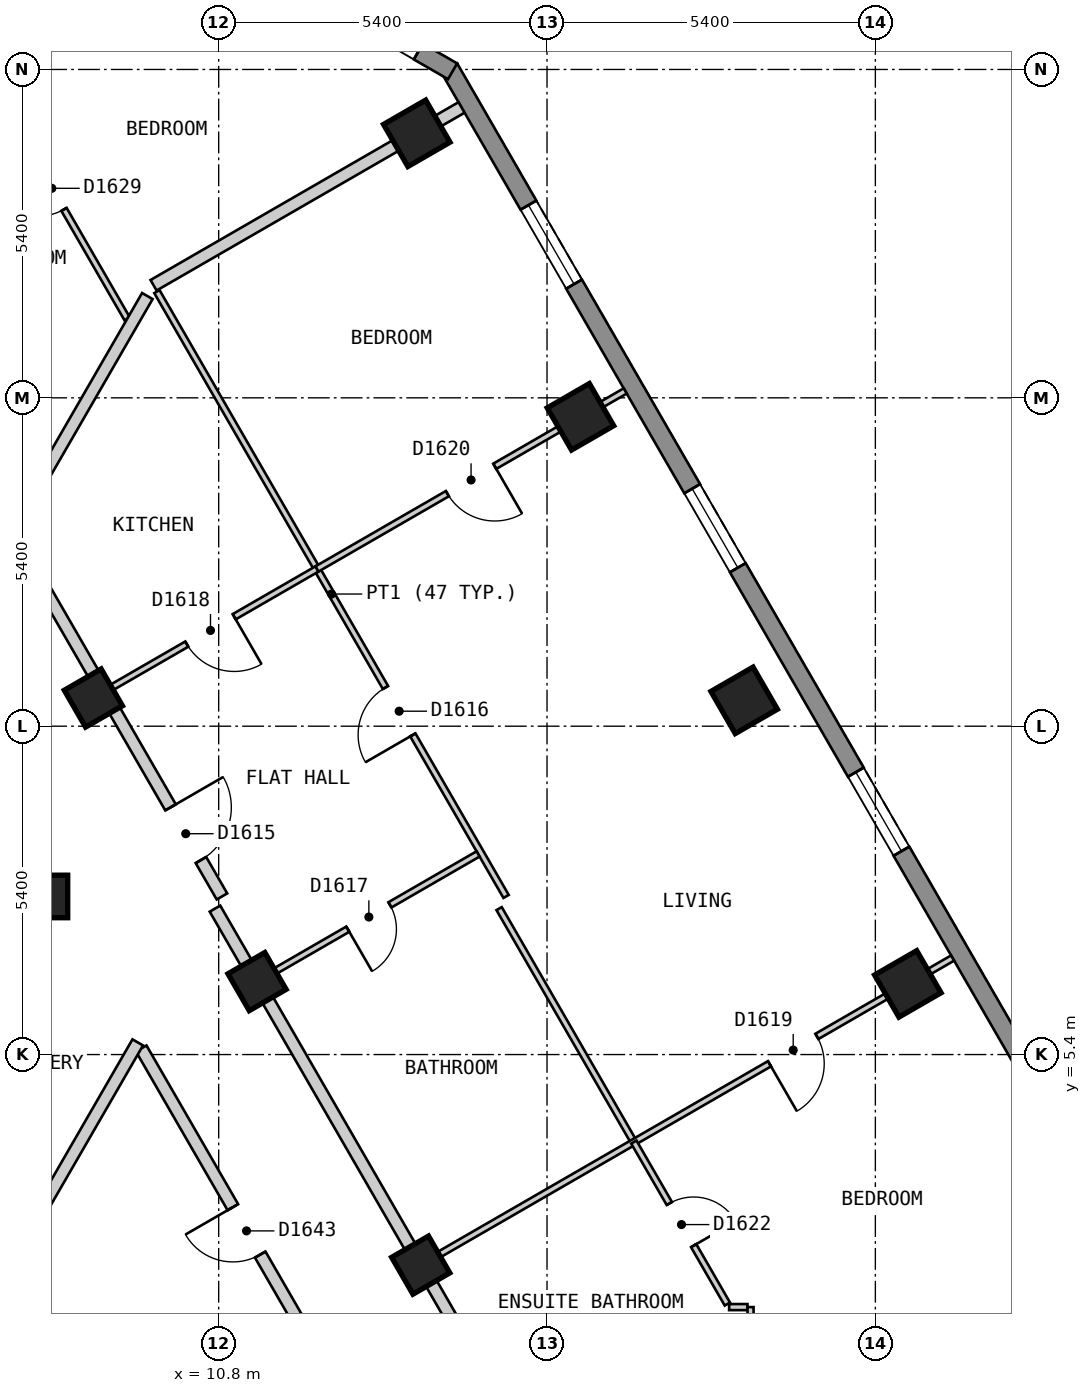
"""IFC4 building model, lengths in metres.
Left out: names, types, materials, properties, quantities, classifications, styles, units other than length and angle.
Written with IfcOpenShell. Run it as: python <this file> out.ifc"""

import sys

from ifc_helpers import new_model, si_unit, direction, frame, frame_2d, origin, origin_2d, place, context, subcontext, project, spatial, polyline, rectangle, outline, extrude, element, fill, save


model = new_model("IFC4")
c1 = context("Model", 3, precision=1e-05, world=origin(), true_north=direction((0.0, 1.0)))
c2 = subcontext(c1, "Body", "Model", "MODEL_VIEW")
j1 = project(units=[si_unit("LENGTHUNIT", "METRE"), si_unit("PLANEANGLEUNIT", "RADIAN")], contexts=[c1])
p1 = place(None, origin())
s1 = spatial("IfcSite", under=j1, at=p1, CompositionType="ELEMENT")
p2 = place(p1, origin())
s2 = spatial("IfcBuilding", under=s1, at=p2, CompositionType="ELEMENT")
p3 = place(p2, frame((0.0, 0.0, 169.2)))
s3 = spatial("IfcBuildingStorey", under=s2, at=p3, CompositionType="ELEMENT", Elevation=169.2)
for number, where, z_axis, x_axis in (
    (1, (22.134, 6.562, 0.0), (0.0, 0.0, 1.0), (-0.5, 0.866, 0.0)),
    (2, (19.442, 11.225, 0.0), (0.0, 0.0, 1.0), (-0.5, 0.866, 0.0)),
    (3, (16.75, 15.888, 0.0), (0.0, 0.0, 1.0), (-0.5, 0.866, 0.0)),
    (4, (14.058, 20.55, 0.0), (0.0, 0.0, 1.0), (-0.5, 0.866, 0.0)),
):
    element("IfcColumn", number, at=place(p3, frame(where, z_axis=z_axis, x_axis=x_axis)), inside=s3, PredefinedType="COLUMN", context=c2, shape_type="SweptSolid", body=[
        extrude(rectangle(XDim=0.8, YDim=0.8, at=origin_2d()), origin(), (0.0, 0.0, 1.0), 3.0),
    ])
for number, where, z_axis, x_axis in (
    (5, (14.123, 1.937, 0.0), (0.0, 0.0, 1.0), (-0.5, 0.866, 0.0)),
    (6, (11.431, 6.6, 0.0), (0.0, 0.0, 1.0), (-0.5, 0.866, 0.0)),
    (7, (7.967, 8.0, 0.0), (0.0, 0.0, 1.0), (1.0, 0.0, 0.0)),
    (8, (8.739, 11.263, 0.0), (0.0, 0.0, 1.0), (-0.5, 0.866, 0.0)),
):
    element("IfcColumn", number, at=place(p3, frame(where, z_axis=z_axis, x_axis=x_axis)), inside=s3, PredefinedType="COLUMN", context=c2, shape_type="SweptSolid", body=[
        extrude(rectangle(XDim=0.7, YDim=0.7, at=origin_2d()), origin(), (0.0, 0.0, 1.0), 3.0),
    ])
p4 = place(p3, frame((26.024, 1.825, 0.0), z_axis=(0.0, 0.0, 1.0), x_axis=(-0.500010537973, 0.866019319597, 0.0)))
e9 = element("IfcWall", 9, at=p4, inside=s3, PredefinedType="SOLIDWALL", context=c2, shape_type="SweptSolid", body=[
    extrude(outline(polyline([(0.0, -0.15), (22.863, -0.15), (22.783, 0.15), (0.08, 0.15), (0.0, -0.15)])), origin(), (0.0, 0.0, 1.0), 2.7),
])
p5 = place(p4, frame((2.606, 0.0, 0.15)))
e10 = element("IfcOpeningElement", 10, at=p5, cuts=e9, PredefinedType="OPENING", context=c2, shape_type="SweptSolid", body=[
    extrude(rectangle(XDim=1.5, YDim=2.1, at=frame_2d((0.75, 1.05))), frame((0.0, 0.16, 0.0), z_axis=(0.0, -1.0, 0.0), x_axis=(1.0, 0.0, 0.0)), (0.0, 0.0, 1.0), 0.32),
])
p6 = place(p4, frame((7.99, 0.0, 0.15)))
e11 = element("IfcOpeningElement", 11, at=p6, cuts=e9, PredefinedType="OPENING", context=c2, shape_type="SweptSolid", body=[
    extrude(rectangle(XDim=1.5, YDim=2.1, at=frame_2d((0.75, 1.05))), frame((0.0, 0.16, 0.0), z_axis=(0.0, -1.0, 0.0), x_axis=(1.0, 0.0, 0.0)), (0.0, 0.0, 1.0), 0.32),
])
p7 = place(p4, frame((13.373, 0.0, 0.15)))
e12 = element("IfcOpeningElement", 12, at=p7, cuts=e9, PredefinedType="OPENING", context=c2, shape_type="SweptSolid", body=[
    extrude(rectangle(XDim=1.5, YDim=2.1, at=frame_2d((0.75, 1.05))), frame((0.0, 0.16, 0.0), z_axis=(0.0, -1.0, 0.0), x_axis=(1.0, 0.0, 0.0)), (0.0, 0.0, 1.0), 0.32),
])
p8 = place(p4, frame((18.758, 0.0, 0.15)))
e13 = element("IfcOpeningElement", 13, at=p8, cuts=e9, PredefinedType="OPENING", context=c2, shape_type="SweptSolid", body=[
    extrude(rectangle(XDim=1.5, YDim=2.1, at=frame_2d((0.75, 1.05))), frame((0.0, 0.16, 0.0), z_axis=(0.0, -1.0, 0.0), x_axis=(1.0, 0.0, 0.0)), (0.0, 0.0, 1.0), 0.32),
])
p9 = place(p3, frame((14.647, 21.57, 0.0), z_axis=(0.0, 0.0, 1.0), x_axis=(-0.866022959057, 0.500004234368, 0.0)))
e14 = element("IfcWall", 14, at=p9, inside=s3, PredefinedType="SOLIDWALL", context=c2, shape_type="SweptSolid", body=[
    extrude(outline(polyline([(0.0, -0.15), (5.0, -0.15), (4.92, 0.15), (0.08, 0.15), (0.0, -0.15)])), origin(), (0.0, 0.0, 1.0), 2.7),
])
p10 = place(p9, frame((0.65, 0.0, 0.15)))
e15 = element("IfcOpeningElement", 15, at=p10, cuts=e14, PredefinedType="OPENING", context=c2, shape_type="SweptSolid", body=[
    extrude(rectangle(XDim=1.2, YDim=2.1, at=frame_2d((0.6, 1.05))), frame((0.0, 0.16, 0.0), z_axis=(0.0, -1.0, 0.0), x_axis=(1.0, 0.0, 0.0)), (0.0, 0.0, 1.0), 0.32),
])
p11 = place(p3, frame((9.526, 5.5, 0.0), z_axis=(0.0, 0.0, 1.0), x_axis=(0.500062092869, -0.865989551482, 0.0)))
e16 = element("IfcWall", 16, at=p11, inside=s3, PredefinedType="PARTITIONING", context=c2, shape_type="SweptSolid", body=[
    extrude(rectangle(XDim=6.927, YDim=0.2, at=frame_2d((3.464, 0.0))), origin(), (0.0, 0.0, 1.0), 2.7),
])
p12 = place(p11, frame((3.014, 0.0, 0.0)))
e17 = element("IfcOpeningElement", 17, at=p12, cuts=e16, PredefinedType="OPENING", context=c2, shape_type="SweptSolid", body=[
    extrude(rectangle(XDim=0.9, YDim=2.1, at=frame_2d((0.45, 1.05))), frame((0.0, 0.11, 0.0), z_axis=(0.0, -1.0, 0.0), x_axis=(1.0, 0.0, 0.0)), (0.0, 0.0, 1.0), 0.22),
])
p13 = place(p3, frame((10.739, 7.8, 0.0), z_axis=(0.0, 0.0, 1.0), x_axis=(0.499964311759, -0.86604600742, 0.0)))
e18 = element("IfcWall", 18, at=p13, inside=s3, PredefinedType="PARTITIONING", context=c2, shape_type="SweptSolid", body=[
    extrude(rectangle(XDim=9.583, YDim=0.2, at=frame_2d((4.792, 0.0))), origin(), (0.0, 0.0, 1.0), 2.7),
])
p14 = place(p3, frame((5.485, 17.3, 0.0), z_axis=(0.0, 0.0, 1.0), x_axis=(0.499965832213, -0.866045129667, 0.0)))
e19 = element("IfcWall", 19, at=p14, inside=s3, PredefinedType="PARTITIONING", context=c2, shape_type="SweptSolid", body=[
    extrude(rectangle(XDim=10.739, YDim=0.2, at=frame_2d((5.369, 0.0))), origin(), (0.0, 0.0, 1.0), 2.7),
])
p15 = place(p14, frame((9.047, 0.0, 0.0)))
e20 = element("IfcOpeningElement", 20, at=p15, cuts=e19, PredefinedType="OPENING", context=c2, shape_type="SweptSolid", body=[
    extrude(rectangle(XDim=1.0, YDim=2.1, at=frame_2d((0.5, 1.05))), frame((0.0, 0.11, 0.0), z_axis=(0.0, -1.0, 0.0), x_axis=(1.0, 0.0, 0.0)), (0.0, 0.0, 1.0), 0.22),
])
p16 = place(p3, frame((7.028, 1.373, 0.0), z_axis=(0.0, 0.0, 1.0), x_axis=(0.500065924398, 0.86598733897, 0.0)))
e21 = element("IfcWall", 21, at=p16, inside=s3, PredefinedType="PARTITIONING", context=c2, shape_type="SweptSolid", body=[
    extrude(rectangle(XDim=4.881, YDim=0.2, at=frame_2d((2.44, 0.0))), origin(), (0.0, 0.0, 1.0), 2.7),
])
p17 = place(p3, frame((7.419, 20.749, 0.0), z_axis=(0.0, 0.0, 1.0), x_axis=(0.499917691695, -0.866072919292, 0.0)))
e22 = element("IfcWall", 22, at=p17, inside=s3, PredefinedType="PARTITIONING", context=c2, shape_type="SweptSolid", body=[
    extrude(rectangle(XDim=3.753, YDim=0.1, at=frame_2d((1.876, 0.0))), origin(), (0.0, 0.0, 1.0), 2.7),
])
p18 = place(p17, frame((0.874, 0.0, 0.0)))
e23 = element("IfcOpeningElement", 23, at=p18, cuts=e22, PredefinedType="OPENING", context=c2, shape_type="SweptSolid", body=[
    extrude(rectangle(XDim=0.8, YDim=2.1, at=frame_2d((0.4, 1.05))), frame((0.0, 0.06, 0.0), z_axis=(0.0, -1.0, 0.0), x_axis=(1.0, 0.0, 0.0)), (0.0, 0.0, 1.0), 0.12),
])
p19 = place(p3, frame((15.412, 7.8, 0.0), z_axis=(0.0, 0.0, 1.0), x_axis=(0.499882970317, -0.866092960361, 0.0)))
e24 = element("IfcWall", 24, at=p19, inside=s3, PredefinedType="PARTITIONING", context=c2, shape_type="SweptSolid", body=[
    extrude(rectangle(XDim=4.433, YDim=0.1, at=frame_2d((2.216, 0.0))), origin(), (0.0, 0.0, 1.0), 2.7),
])
p20 = place(p3, frame((9.784, 17.947, 0.0), z_axis=(0.0, 0.0, 1.0), x_axis=(0.500016228266, -0.866016034188, 0.0)))
e25 = element("IfcWall", 25, at=p20, inside=s3, PredefinedType="PARTITIONING", context=c2, shape_type="SweptSolid", body=[
    extrude(rectangle(XDim=11.486, YDim=0.1, at=frame_2d((5.743, 0.0))), origin(), (0.0, 0.0, 1.0), 2.7),
])
p21 = place(p20, frame((7.518, 0.0, 0.0)))
e26 = element("IfcOpeningElement", 26, at=p21, cuts=e25, PredefinedType="OPENING", context=c2, shape_type="SweptSolid", body=[
    extrude(rectangle(XDim=0.9, YDim=2.1, at=frame_2d((0.45, 1.05))), frame((0.0, 0.06, 0.0), z_axis=(0.0, -1.0, 0.0), x_axis=(1.0, 0.0, 0.0)), (0.0, 0.0, 1.0), 0.12),
])
p22 = place(p3, frame((19.195, 1.247, 0.0), z_axis=(0.0, 0.0, 1.0), x_axis=(1.0, 0.0, 0.0)))
e27 = element("IfcWall", 27, at=p22, inside=s3, PredefinedType="PARTITIONING", context=c2, shape_type="SweptSolid", body=[
    extrude(rectangle(XDim=0.302, YDim=0.1, at=frame_2d((0.151, 0.0))), origin(), (0.0, 0.0, 1.0), 2.7),
])
p23 = place(p3, frame((19.547, 0.638, 0.0), z_axis=(0.0, 0.0, 1.0), x_axis=(0.0, 1.0, 0.0)))
e28 = element("IfcWall", 28, at=p23, inside=s3, PredefinedType="PARTITIONING", context=c2, shape_type="SweptSolid", body=[
    extrude(rectangle(XDim=0.609, YDim=0.1, at=frame_2d((0.305, 0.0))), origin(), (0.0, 0.0, 1.0), 2.7),
])
p24 = place(p3, frame((14.21, 1.987, 0.0), z_axis=(0.0, 0.0, 1.0), x_axis=(0.866022959057, 0.500004234368, 0.0)))
e29 = element("IfcWall", 29, at=p24, inside=s3, PredefinedType="PARTITIONING", context=c2, shape_type="SweptSolid", body=[
    extrude(rectangle(XDim=10.0, YDim=0.1, at=frame_2d((5.0, 0.0))), origin(), (0.0, 0.0, 1.0), 2.7),
])
p25 = place(p24, frame((6.523, 0.0, 0.0)))
e30 = element("IfcOpeningElement", 30, at=p25, cuts=e29, PredefinedType="OPENING", context=c2, shape_type="SweptSolid", body=[
    extrude(rectangle(XDim=0.9, YDim=2.1, at=frame_2d((0.45, 1.05))), frame((0.0, 0.06, 0.0), z_axis=(0.0, -1.0, 0.0), x_axis=(1.0, 0.0, 0.0)), (0.0, 0.0, 1.0), 0.12),
])
p26 = place(p3, frame((11.518, 6.65, 0.0), z_axis=(0.0, 0.0, 1.0), x_axis=(0.865949381454, 0.500131651427, 0.0)))
e31 = element("IfcWall", 31, at=p26, inside=s3, PredefinedType="PARTITIONING", context=c2, shape_type="SweptSolid", body=[
    extrude(rectangle(XDim=4.097, YDim=0.1, at=frame_2d((2.049, 0.0))), origin(), (0.0, 0.0, 1.0), 2.7),
])
p27 = place(p26, frame((1.623, 0.0, 0.0)))
e32 = element("IfcOpeningElement", 32, at=p27, cuts=e31, PredefinedType="OPENING", context=c2, shape_type="SweptSolid", body=[
    extrude(rectangle(XDim=0.8, YDim=2.1, at=frame_2d((0.4, 1.05))), frame((0.0, 0.06, 0.0), z_axis=(0.0, -1.0, 0.0), x_axis=(1.0, 0.0, 0.0)), (0.0, 0.0, 1.0), 0.12),
])
p28 = place(p3, frame((8.999, 11.413, 0.0), z_axis=(0.0, 0.0, 1.0), x_axis=(0.866076396086, 0.499911668341, 0.0)))
e33 = element("IfcWall", 33, at=p28, inside=s3, PredefinedType="PARTITIONING", context=c2, shape_type="SweptSolid", body=[
    extrude(rectangle(XDim=3.947, YDim=0.1, at=frame_2d((1.973, 0.0))), origin(), (0.0, 0.0, 1.0), 2.7),
])
p29 = place(p28, frame((1.474, 0.0, 0.0)))
e34 = element("IfcOpeningElement", 34, at=p29, cuts=e33, PredefinedType="OPENING", context=c2, shape_type="SweptSolid", body=[
    extrude(rectangle(XDim=0.9, YDim=2.1, at=frame_2d((0.45, 1.05))), frame((0.0, 0.06, 0.0), z_axis=(0.0, -1.0, 0.0), x_axis=(1.0, 0.0, 0.0)), (0.0, 0.0, 1.0), 0.12),
])
p30 = place(p3, frame((7.448, 14.1, 0.0), z_axis=(0.0, 0.0, 1.0), x_axis=(0.500013426303, 0.866017651966, 0.0)))
e35 = element("IfcWall", 35, at=p30, inside=s3, PredefinedType="PARTITIONING", context=c2, shape_type="SweptSolid", body=[
    extrude(rectangle(XDim=4.358, YDim=0.2, at=frame_2d((2.179, 0.0))), origin(), (0.0, 0.0, 1.0), 2.7),
])
p31 = place(p3, frame((9.729, 18.051, 0.0), z_axis=(0.0, 0.0, 1.0), x_axis=(0.866038213712, 0.499977811898, 0.0)))
e36 = element("IfcWall", 36, at=p31, inside=s3, PredefinedType="PARTITIONING", context=c2, shape_type="SweptSolid", body=[
    extrude(rectangle(XDim=5.848, YDim=0.2, at=frame_2d((2.924, 0.0))), origin(), (0.0, 0.0, 1.0), 2.7),
])
p32 = place(p3, frame((17.628, 3.961, 0.0), z_axis=(0.0, 0.0, 1.0), x_axis=(0.50003162148, -0.866007146345, 0.0)))
e37 = element("IfcWall", 37, at=p32, inside=s3, PredefinedType="PARTITIONING", context=c2, shape_type="SweptSolid", body=[
    extrude(rectangle(XDim=3.076, YDim=0.1, at=frame_2d((1.538, 0.0))), origin(), (0.0, 0.0, 1.0), 2.7),
])
p33 = place(p32, frame((1.167, 0.0, 0.0)))
e38 = element("IfcOpeningElement", 38, at=p33, cuts=e37, PredefinedType="OPENING", context=c2, shape_type="SweptSolid", body=[
    extrude(rectangle(XDim=0.8, YDim=2.1, at=frame_2d((0.4, 1.05))), frame((0.0, 0.06, 0.0), z_axis=(0.0, -1.0, 0.0), x_axis=(1.0, 0.0, 0.0)), (0.0, 0.0, 1.0), 0.12),
])
p34 = place(p3, frame((12.417, 13.386, 0.0), z_axis=(0.0, 0.0, 1.0), x_axis=(0.86599873886, 0.50004618216, 0.0)))
e39 = element("IfcWall", 39, at=p34, inside=s3, PredefinedType="PARTITIONING", context=c2, shape_type="SweptSolid", body=[
    extrude(rectangle(XDim=5.854, YDim=0.1, at=frame_2d((2.927, 0.0))), origin(), (0.0, 0.0, 1.0), 2.7),
])
p35 = place(p34, frame((2.476, 0.0, 0.0)))
e40 = element("IfcOpeningElement", 40, at=p35, cuts=e39, PredefinedType="OPENING", context=c2, shape_type="SweptSolid", body=[
    extrude(rectangle(XDim=0.9, YDim=2.1, at=frame_2d((0.45, 1.05))), frame((0.0, 0.06, 0.0), z_axis=(0.0, -1.0, 0.0), x_axis=(1.0, 0.0, 0.0)), (0.0, 0.0, 1.0), 0.12),
])
p36 = place(p6, origin())
e41 = element("IfcWindow", 41, at=p36, inside=s3, PartitioningType="SINGLE_PANEL", PredefinedType="WINDOW", context=c2, shape_type="SweptSolid", body=[
    extrude(rectangle(XDim=1.5, YDim=2.1, at=frame_2d((0.75, 1.05))), frame((0.0, 0.03, 0.0), z_axis=(0.0, -1.0, 0.0), x_axis=(1.0, 0.0, 0.0)), (0.0, 0.0, 1.0), 0.06),
])
fill(e11, e41)
p37 = place(p7, origin())
e42 = element("IfcWindow", 42, at=p37, inside=s3, PartitioningType="SINGLE_PANEL", PredefinedType="WINDOW", context=c2, shape_type="SweptSolid", body=[
    extrude(rectangle(XDim=1.5, YDim=2.1, at=frame_2d((0.75, 1.05))), frame((0.0, 0.03, 0.0), z_axis=(0.0, -1.0, 0.0), x_axis=(1.0, 0.0, 0.0)), (0.0, 0.0, 1.0), 0.06),
])
fill(e12, e42)
p38 = place(p8, origin())
e43 = element("IfcWindow", 43, at=p38, inside=s3, PartitioningType="SINGLE_PANEL", PredefinedType="WINDOW", context=c2, shape_type="SweptSolid", body=[
    extrude(rectangle(XDim=1.5, YDim=2.1, at=frame_2d((0.75, 1.05))), frame((0.0, 0.03, 0.0), z_axis=(0.0, -1.0, 0.0), x_axis=(1.0, 0.0, 0.0)), (0.0, 0.0, 1.0), 0.06),
])
fill(e13, e43)
p39 = place(p10, origin())
e44 = element("IfcWindow", 44, at=p39, inside=s3, PartitioningType="SINGLE_PANEL", PredefinedType="WINDOW", context=c2, shape_type="SweptSolid", body=[
    extrude(rectangle(XDim=1.2, YDim=2.1, at=frame_2d((0.6, 1.05))), frame((0.0, 0.03, 0.0), z_axis=(0.0, -1.0, 0.0), x_axis=(1.0, 0.0, 0.0)), (0.0, 0.0, 1.0), 0.06),
])
fill(e15, e44)
p40 = place(p15, origin())
e45 = element("IfcDoor", 45, at=p40, inside=s3, OperationType="SINGLE_SWING_LEFT", PredefinedType="DOOR", context=c2, shape_type="SweptSolid", body=[
    extrude(rectangle(XDim=1.0, YDim=2.1, at=frame_2d((0.5, 1.05))), frame((0.0, 0.025, 0.0), z_axis=(0.0, -1.0, 0.0), x_axis=(1.0, 0.0, 0.0)), (0.0, 0.0, 1.0), 0.05),
])
fill(e20, e45)
p41 = place(p21, origin())
e46 = element("IfcDoor", 46, at=p41, inside=s3, OperationType="SINGLE_SWING_RIGHT", PredefinedType="DOOR", context=c2, shape_type="SweptSolid", body=[
    extrude(rectangle(XDim=0.9, YDim=2.1, at=frame_2d((0.45, 1.05))), frame((0.0, 0.025, 0.0), z_axis=(0.0, -1.0, 0.0), x_axis=(1.0, 0.0, 0.0)), (0.0, 0.0, 1.0), 0.05),
])
fill(e26, e46)
p42 = place(p27, origin())
e47 = element("IfcDoor", 47, at=p42, inside=s3, OperationType="SINGLE_SWING_LEFT", PredefinedType="DOOR", context=c2, shape_type="SweptSolid", body=[
    extrude(rectangle(XDim=0.8, YDim=2.1, at=frame_2d((0.4, 1.05))), frame((0.0, 0.025, 0.0), z_axis=(0.0, -1.0, 0.0), x_axis=(1.0, 0.0, 0.0)), (0.0, 0.0, 1.0), 0.05),
])
fill(e32, e47)
p43 = place(p29, origin())
e48 = element("IfcDoor", 48, at=p43, inside=s3, OperationType="SINGLE_SWING_RIGHT", PredefinedType="DOOR", context=c2, shape_type="SweptSolid", body=[
    extrude(rectangle(XDim=0.9, YDim=2.1, at=frame_2d((0.45, 1.05))), frame((0.0, 0.025, 0.0), z_axis=(0.0, -1.0, 0.0), x_axis=(1.0, 0.0, 0.0)), (0.0, 0.0, 1.0), 0.05),
])
fill(e34, e48)
p44 = place(p25, origin())
e49 = element("IfcDoor", 49, at=p44, inside=s3, OperationType="SINGLE_SWING_LEFT", PredefinedType="DOOR", context=c2, shape_type="SweptSolid", body=[
    extrude(rectangle(XDim=0.9, YDim=2.1, at=frame_2d((0.45, 1.05))), frame((0.0, 0.025, 0.0), z_axis=(0.0, -1.0, 0.0), x_axis=(1.0, 0.0, 0.0)), (0.0, 0.0, 1.0), 0.05),
])
fill(e30, e49)
p45 = place(p35, origin())
e50 = element("IfcDoor", 50, at=p45, inside=s3, OperationType="SINGLE_SWING_RIGHT", PredefinedType="DOOR", context=c2, shape_type="SweptSolid", body=[
    extrude(rectangle(XDim=0.9, YDim=2.1, at=frame_2d((0.45, 1.05))), frame((0.0, 0.025, 0.0), z_axis=(0.0, -1.0, 0.0), x_axis=(1.0, 0.0, 0.0)), (0.0, 0.0, 1.0), 0.05),
])
fill(e40, e50)
p46 = place(p33, origin())
e51 = element("IfcDoor", 51, at=p46, inside=s3, OperationType="SINGLE_SWING_RIGHT", PredefinedType="DOOR", context=c2, shape_type="SweptSolid", body=[
    extrude(rectangle(XDim=0.8, YDim=2.1, at=frame_2d((0.4, 1.05))), frame((0.0, 0.025, 0.0), z_axis=(0.0, -1.0, 0.0), x_axis=(1.0, 0.0, 0.0)), (0.0, 0.0, 1.0), 0.05),
])
fill(e38, e51)
p47 = place(p18, origin())
e52 = element("IfcDoor", 52, at=p47, inside=s3, OperationType="SINGLE_SWING_LEFT", PredefinedType="DOOR", context=c2, shape_type="SweptSolid", body=[
    extrude(rectangle(XDim=0.8, YDim=2.1, at=frame_2d((0.4, 1.05))), frame((0.0, 0.025, 0.0), z_axis=(0.0, -1.0, 0.0), x_axis=(1.0, 0.0, 0.0)), (0.0, 0.0, 1.0), 0.05),
])
fill(e23, e52)
p48 = place(p12, origin())
e53 = element("IfcDoor", 53, at=p48, inside=s3, OperationType="SINGLE_SWING_LEFT", PredefinedType="DOOR", context=c2, shape_type="SweptSolid", body=[
    extrude(rectangle(XDim=0.9, YDim=2.1, at=frame_2d((0.45, 1.05))), frame((0.0, 0.025, 0.0), z_axis=(0.0, -1.0, 0.0), x_axis=(1.0, 0.0, 0.0)), (0.0, 0.0, 1.0), 0.05),
])
fill(e17, e53)
save(model, sys.argv[1])
